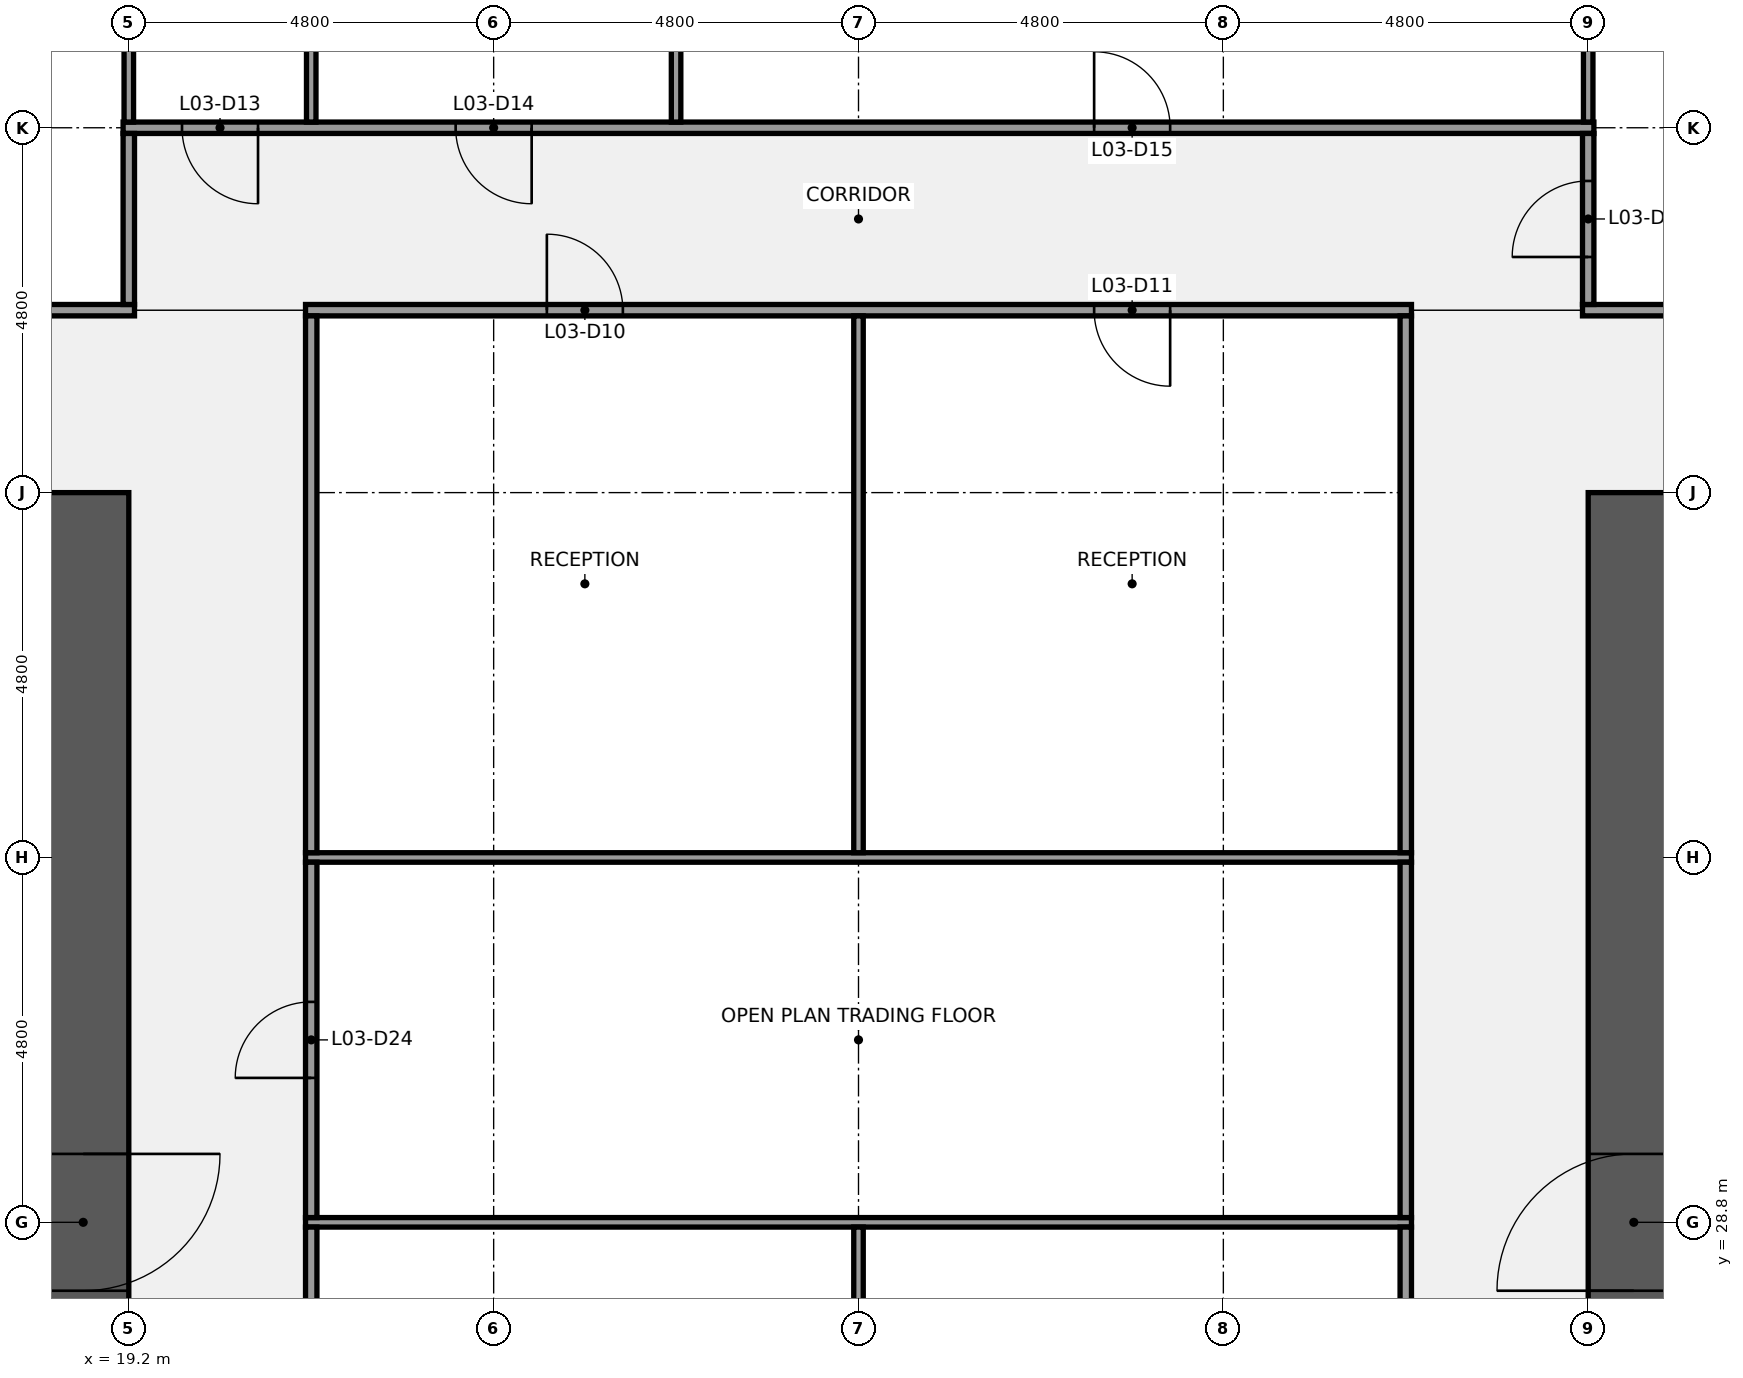
"""IFC4 building model, lengths in metres.
Left out: names, types, materials, properties, quantities, classifications, styles, units other than length and angle.
Written with IfcOpenShell. Run it as: python <this file> out.ifc"""

import sys

from ifc_helpers import new_model, si_unit, direction, frame, frame_2d, origin, place, context, subcontext, project, spatial, rectangle, extrude, element, fill, save


model = new_model("IFC4")
c1 = context("Model", 3, precision=1e-05, world=origin(), true_north=direction((0.0, 1.0)))
c2 = subcontext(c1, "Body", "Model", "MODEL_VIEW")
j1 = project(units=[si_unit("LENGTHUNIT", "METRE"), si_unit("PLANEANGLEUNIT", "RADIAN")], contexts=[c1])
p1 = place(None, origin())
s1 = spatial("IfcSite", under=j1, at=p1, CompositionType="ELEMENT")
p2 = place(p1, origin())
s2 = spatial("IfcBuilding", under=s1, at=p2, CompositionType="ELEMENT")
p3 = place(p2, frame((0.0, 0.0, 21.4)))
s3 = spatial("IfcBuildingStorey", under=s2, at=p3, CompositionType="ELEMENT", Elevation=21.4)
p4 = place(p3, frame((18.6, 38.4, 0.0), z_axis=(0.0, 0.0, 1.0), x_axis=(0.0, -1.0, 0.0)))
e1 = element("IfcWall", 1, at=p4, inside=s3, PredefinedType="SHEAR", context=c2, shape_type="SweptSolid", body=[
    extrude(rectangle(XDim=28.8, YDim=1.2, at=frame_2d((14.4, 0.0))), origin(), (0.0, 0.0, 1.0), 4.24),
])
p5 = place(p4, frame((18.3, 0.0, 0.0)))
e2 = element("IfcOpeningElement", 2, at=p5, cuts=e1, PredefinedType="OPENING", context=c2, shape_type="SweptSolid", body=[
    extrude(rectangle(XDim=1.8, YDim=2.1, at=frame_2d((0.9, 1.05))), frame((0.0, 0.61, 0.0), z_axis=(0.0, -1.0, 0.0), x_axis=(1.0, 0.0, 0.0)), (0.0, 0.0, 1.0), 1.22),
])
p6 = place(p4, frame((8.7, 0.0, 0.0)))
e3 = element("IfcOpeningElement", 3, at=p6, cuts=e1, PredefinedType="OPENING", context=c2, shape_type="SweptSolid", body=[
    extrude(rectangle(XDim=1.8, YDim=2.1, at=frame_2d((0.9, 1.05))), frame((0.0, 0.61, 0.0), z_axis=(0.0, -1.0, 0.0), x_axis=(1.0, 0.0, 0.0)), (0.0, 0.0, 1.0), 1.22),
])
p7 = place(p3, frame((39.0, 9.6, 0.0), z_axis=(0.0, 0.0, 1.0), x_axis=(0.0, 1.0, 0.0)))
e4 = element("IfcWall", 4, at=p7, inside=s3, PredefinedType="SHEAR", context=c2, shape_type="SweptSolid", body=[
    extrude(rectangle(XDim=28.8, YDim=1.2, at=frame_2d((14.4, 0.0))), origin(), (0.0, 0.0, 1.0), 4.24),
])
p8 = place(p7, frame((8.7, 0.0, 0.0)))
e5 = element("IfcOpeningElement", 5, at=p8, cuts=e4, PredefinedType="OPENING", context=c2, shape_type="SweptSolid", body=[
    extrude(rectangle(XDim=1.8, YDim=2.1, at=frame_2d((0.9, 1.05))), frame((0.0, 0.61, 0.0), z_axis=(0.0, -1.0, 0.0), x_axis=(1.0, 0.0, 0.0)), (0.0, 0.0, 1.0), 1.22),
])
p9 = place(p7, frame((18.3, 0.0, 0.0)))
e6 = element("IfcOpeningElement", 6, at=p9, cuts=e4, PredefinedType="OPENING", context=c2, shape_type="SweptSolid", body=[
    extrude(rectangle(XDim=1.8, YDim=2.1, at=frame_2d((0.9, 1.05))), frame((0.0, 0.61, 0.0), z_axis=(0.0, -1.0, 0.0), x_axis=(1.0, 0.0, 0.0)), (0.0, 0.0, 1.0), 1.22),
])
for number, where, z_axis, x_axis in (
    (7, (21.525, 28.8, 0.0), (0.0, 0.0, 1.0), (1.0, 0.0, 0.0)),
    (8, (21.525, 33.6, 0.0), (0.0, 0.0, 1.0), (1.0, 0.0, 0.0)),
):
    element("IfcWall", number, at=place(p3, frame(where, z_axis=z_axis, x_axis=x_axis)), inside=s3, PredefinedType="PARTITIONING", context=c2, shape_type="SweptSolid", body=[
        extrude(rectangle(XDim=14.55, YDim=0.125, at=frame_2d((7.275, 0.0))), origin(), (0.0, 0.0, 1.0), 3.27),
    ])
p10 = place(p3, frame((14.325, 40.8, 0.0), z_axis=(0.0, 0.0, 1.0), x_axis=(1.0, 0.0, 0.0)))
e9 = element("IfcWall", 9, at=p10, inside=s3, PredefinedType="PARTITIONING", context=c2, shape_type="SweptSolid", body=[
    extrude(rectangle(XDim=4.95, YDim=0.15, at=frame_2d((2.475, 0.0))), origin(), (0.0, 0.0, 1.0), 3.27),
])
p11 = place(p10, frame((1.975, 0.0, 0.0)))
e10 = element("IfcOpeningElement", 10, at=p11, cuts=e9, PredefinedType="OPENING", context=c2, shape_type="SweptSolid", body=[
    extrude(rectangle(XDim=1.0, YDim=2.1, at=frame_2d((0.5, 1.05))), frame((0.0, 0.085, 0.0), z_axis=(0.0, -1.0, 0.0), x_axis=(1.0, 0.0, 0.0)), (0.0, 0.0, 1.0), 0.17),
])
p12 = place(p3, frame((21.525, 40.8, 0.0), z_axis=(0.0, 0.0, 1.0), x_axis=(1.0, 0.0, 0.0)))
e11 = element("IfcWall", 11, at=p12, inside=s3, PredefinedType="PARTITIONING", context=c2, shape_type="SweptSolid", body=[
    extrude(rectangle(XDim=14.55, YDim=0.15, at=frame_2d((7.275, 0.0))), origin(), (0.0, 0.0, 1.0), 3.27),
])
p13 = place(p12, frame((3.175, 0.0, 0.0)))
e12 = element("IfcOpeningElement", 12, at=p13, cuts=e11, PredefinedType="OPENING", context=c2, shape_type="SweptSolid", body=[
    extrude(rectangle(XDim=1.0, YDim=2.1, at=frame_2d((0.5, 1.05))), frame((0.0, 0.085, 0.0), z_axis=(0.0, -1.0, 0.0), x_axis=(1.0, 0.0, 0.0)), (0.0, 0.0, 1.0), 0.17),
])
p14 = place(p12, frame((10.375, 0.0, 0.0)))
e13 = element("IfcOpeningElement", 13, at=p14, cuts=e11, PredefinedType="OPENING", context=c2, shape_type="SweptSolid", body=[
    extrude(rectangle(XDim=1.0, YDim=2.1, at=frame_2d((0.5, 1.05))), frame((0.0, 0.085, 0.0), z_axis=(0.0, -1.0, 0.0), x_axis=(1.0, 0.0, 0.0)), (0.0, 0.0, 1.0), 0.17),
])
p15 = place(p3, frame((38.325, 40.8, 0.0), z_axis=(0.0, 0.0, 1.0), x_axis=(1.0, 0.0, 0.0)))
e14 = element("IfcWall", 14, at=p15, inside=s3, PredefinedType="PARTITIONING", context=c2, shape_type="SweptSolid", body=[
    extrude(rectangle(XDim=9.75, YDim=0.15, at=frame_2d((4.875, 0.0))), origin(), (0.0, 0.0, 1.0), 3.27),
])
p16 = place(p15, frame((3.175, 0.0, 0.0)))
e15 = element("IfcOpeningElement", 15, at=p16, cuts=e14, PredefinedType="OPENING", context=c2, shape_type="SweptSolid", body=[
    extrude(rectangle(XDim=1.0, YDim=2.1, at=frame_2d((0.5, 1.05))), frame((0.0, 0.085, 0.0), z_axis=(0.0, -1.0, 0.0), x_axis=(1.0, 0.0, 0.0)), (0.0, 0.0, 1.0), 0.17),
])
p17 = place(p3, frame((19.125, 43.2, 0.0), z_axis=(0.0, 0.0, 1.0), x_axis=(1.0, 0.0, 0.0)))
e16 = element("IfcWall", 16, at=p17, inside=s3, PredefinedType="PARTITIONING", context=c2, shape_type="SweptSolid", body=[
    extrude(rectangle(XDim=19.35, YDim=0.15, at=frame_2d((9.675, 0.0))), origin(), (0.0, 0.0, 1.0), 3.27),
])
p18 = place(p17, frame((0.775, 0.0, 0.0)))
e17 = element("IfcOpeningElement", 17, at=p18, cuts=e16, PredefinedType="OPENING", context=c2, shape_type="SweptSolid", body=[
    extrude(rectangle(XDim=1.0, YDim=2.1, at=frame_2d((0.5, 1.05))), frame((0.0, 0.085, 0.0), z_axis=(0.0, -1.0, 0.0), x_axis=(1.0, 0.0, 0.0)), (0.0, 0.0, 1.0), 0.17),
])
p19 = place(p17, frame((4.375, 0.0, 0.0)))
e18 = element("IfcOpeningElement", 18, at=p19, cuts=e16, PredefinedType="OPENING", context=c2, shape_type="SweptSolid", body=[
    extrude(rectangle(XDim=1.0, YDim=2.1, at=frame_2d((0.5, 1.05))), frame((0.0, 0.085, 0.0), z_axis=(0.0, -1.0, 0.0), x_axis=(1.0, 0.0, 0.0)), (0.0, 0.0, 1.0), 0.17),
])
p20 = place(p17, frame((12.775, 0.0, 0.0)))
e19 = element("IfcOpeningElement", 19, at=p20, cuts=e16, PredefinedType="OPENING", context=c2, shape_type="SweptSolid", body=[
    extrude(rectangle(XDim=1.0, YDim=2.1, at=frame_2d((0.5, 1.05))), frame((0.0, 0.085, 0.0), z_axis=(0.0, -1.0, 0.0), x_axis=(1.0, 0.0, 0.0)), (0.0, 0.0, 1.0), 0.17),
])
p21 = place(p3, frame((19.2, 43.275, 0.0), z_axis=(0.0, 0.0, 1.0), x_axis=(0.0, 1.0, 0.0)))
e20 = element("IfcWall", 20, at=p21, inside=s3, PredefinedType="PARTITIONING", context=c2, shape_type="SweptSolid", body=[
    extrude(rectangle(XDim=4.075, YDim=0.125, at=frame_2d((2.038, 0.0))), origin(), (0.0, 0.0, 1.0), 3.27),
])
p22 = place(p3, frame((19.2, 40.875, 0.0), z_axis=(0.0, 0.0, 1.0), x_axis=(0.0, 1.0, 0.0)))
e21 = element("IfcWall", 21, at=p22, inside=s3, PredefinedType="PARTITIONING", context=c2, shape_type="SweptSolid", body=[
    extrude(rectangle(XDim=2.25, YDim=0.15, at=frame_2d((1.125, 0.0))), origin(), (0.0, 0.0, 1.0), 3.27),
])
p23 = place(p3, frame((21.6, 43.275, 0.0), z_axis=(0.0, 0.0, 1.0), x_axis=(0.0, 1.0, 0.0)))
e22 = element("IfcWall", 22, at=p23, inside=s3, PredefinedType="PARTITIONING", context=c2, shape_type="SweptSolid", body=[
    extrude(rectangle(XDim=4.625, YDim=0.125, at=frame_2d((2.312, 0.0))), origin(), (0.0, 0.0, 1.0), 3.27),
])
p24 = place(p3, frame((21.6, 21.663, 0.0), z_axis=(0.0, 0.0, 1.0), x_axis=(0.0, 1.0, 0.0)))
e23 = element("IfcWall", 23, at=p24, inside=s3, PredefinedType="PARTITIONING", context=c2, shape_type="SweptSolid", body=[
    extrude(rectangle(XDim=7.075, YDim=0.15, at=frame_2d((3.538, 0.0))), origin(), (0.0, 0.0, 1.0), 3.27),
])
p25 = place(p24, frame((3.038, 0.0, 0.0)))
e24 = element("IfcOpeningElement", 24, at=p25, cuts=e23, PredefinedType="OPENING", context=c2, shape_type="SweptSolid", body=[
    extrude(rectangle(XDim=1.0, YDim=2.1, at=frame_2d((0.5, 1.05))), frame((0.0, 0.085, 0.0), z_axis=(0.0, -1.0, 0.0), x_axis=(1.0, 0.0, 0.0)), (0.0, 0.0, 1.0), 0.17),
])
p26 = place(p3, frame((21.6, 28.863, 0.0), z_axis=(0.0, 0.0, 1.0), x_axis=(0.0, 1.0, 0.0)))
e25 = element("IfcWall", 25, at=p26, inside=s3, PredefinedType="PARTITIONING", context=c2, shape_type="SweptSolid", body=[
    extrude(rectangle(XDim=4.675, YDim=0.15, at=frame_2d((2.337, 0.0))), origin(), (0.0, 0.0, 1.0), 3.27),
])
p27 = place(p26, frame((1.837, 0.0, 0.0)))
e26 = element("IfcOpeningElement", 26, at=p27, cuts=e25, PredefinedType="OPENING", context=c2, shape_type="SweptSolid", body=[
    extrude(rectangle(XDim=1.0, YDim=2.1, at=frame_2d((0.5, 1.05))), frame((0.0, 0.085, 0.0), z_axis=(0.0, -1.0, 0.0), x_axis=(1.0, 0.0, 0.0)), (0.0, 0.0, 1.0), 0.17),
])
p28 = place(p3, frame((21.6, 33.663, 0.0), z_axis=(0.0, 0.0, 1.0), x_axis=(0.0, 1.0, 0.0)))
e27 = element("IfcWall", 27, at=p28, inside=s3, PredefinedType="PARTITIONING", context=c2, shape_type="SweptSolid", body=[
    extrude(rectangle(XDim=7.062, YDim=0.15, at=frame_2d((3.531, 0.0))), origin(), (0.0, 0.0, 1.0), 3.27),
])
p29 = place(p3, frame((26.4, 43.275, 0.0), z_axis=(0.0, 0.0, 1.0), x_axis=(0.0, 1.0, 0.0)))
e28 = element("IfcWall", 28, at=p29, inside=s3, PredefinedType="PARTITIONING", context=c2, shape_type="SweptSolid", body=[
    extrude(rectangle(XDim=4.625, YDim=0.125, at=frame_2d((2.312, 0.0))), origin(), (0.0, 0.0, 1.0), 3.27),
])
p30 = place(p3, frame((28.8, 21.663, 0.0), z_axis=(0.0, 0.0, 1.0), x_axis=(0.0, 1.0, 0.0)))
e29 = element("IfcWall", 29, at=p30, inside=s3, PredefinedType="PARTITIONING", context=c2, shape_type="SweptSolid", body=[
    extrude(rectangle(XDim=7.075, YDim=0.125, at=frame_2d((3.538, 0.0))), origin(), (0.0, 0.0, 1.0), 3.27),
])
p31 = place(p3, frame((28.8, 33.663, 0.0), z_axis=(0.0, 0.0, 1.0), x_axis=(0.0, 1.0, 0.0)))
e30 = element("IfcWall", 30, at=p31, inside=s3, PredefinedType="PARTITIONING", context=c2, shape_type="SweptSolid", body=[
    extrude(rectangle(XDim=7.062, YDim=0.125, at=frame_2d((3.531, 0.0))), origin(), (0.0, 0.0, 1.0), 3.27),
])
p32 = place(p3, frame((36.0, 21.663, 0.0), z_axis=(0.0, 0.0, 1.0), x_axis=(0.0, 1.0, 0.0)))
e31 = element("IfcWall", 31, at=p32, inside=s3, PredefinedType="PARTITIONING", context=c2, shape_type="SweptSolid", body=[
    extrude(rectangle(XDim=7.075, YDim=0.15, at=frame_2d((3.538, 0.0))), origin(), (0.0, 0.0, 1.0), 3.27),
])
p33 = place(p32, frame((3.038, 0.0, 0.0)))
e32 = element("IfcOpeningElement", 32, at=p33, cuts=e31, PredefinedType="OPENING", context=c2, shape_type="SweptSolid", body=[
    extrude(rectangle(XDim=1.0, YDim=2.1, at=frame_2d((0.5, 1.05))), frame((0.0, 0.085, 0.0), z_axis=(0.0, -1.0, 0.0), x_axis=(1.0, 0.0, 0.0)), (0.0, 0.0, 1.0), 0.17),
])
p34 = place(p3, frame((36.0, 28.863, 0.0), z_axis=(0.0, 0.0, 1.0), x_axis=(0.0, 1.0, 0.0)))
e33 = element("IfcWall", 33, at=p34, inside=s3, PredefinedType="PARTITIONING", context=c2, shape_type="SweptSolid", body=[
    extrude(rectangle(XDim=4.675, YDim=0.15, at=frame_2d((2.337, 0.0))), origin(), (0.0, 0.0, 1.0), 3.27),
])
p35 = place(p3, frame((36.0, 33.663, 0.0), z_axis=(0.0, 0.0, 1.0), x_axis=(0.0, 1.0, 0.0)))
e34 = element("IfcWall", 34, at=p35, inside=s3, PredefinedType="PARTITIONING", context=c2, shape_type="SweptSolid", body=[
    extrude(rectangle(XDim=7.062, YDim=0.15, at=frame_2d((3.531, 0.0))), origin(), (0.0, 0.0, 1.0), 3.27),
])
p36 = place(p3, frame((38.4, 43.275, 0.0), z_axis=(0.0, 0.0, 1.0), x_axis=(0.0, 1.0, 0.0)))
e35 = element("IfcWall", 35, at=p36, inside=s3, PredefinedType="PARTITIONING", context=c2, shape_type="SweptSolid", body=[
    extrude(rectangle(XDim=4.075, YDim=0.125, at=frame_2d((2.038, 0.0))), origin(), (0.0, 0.0, 1.0), 3.27),
])
p37 = place(p3, frame((38.4, 40.875, 0.0), z_axis=(0.0, 0.0, 1.0), x_axis=(0.0, 1.0, 0.0)))
e36 = element("IfcWall", 36, at=p37, inside=s3, PredefinedType="PARTITIONING", context=c2, shape_type="SweptSolid", body=[
    extrude(rectangle(XDim=2.25, YDim=0.15, at=frame_2d((1.125, 0.0))), origin(), (0.0, 0.0, 1.0), 3.27),
])
p38 = place(p37, frame((0.625, 0.0, 0.0)))
e37 = element("IfcOpeningElement", 37, at=p38, cuts=e36, PredefinedType="OPENING", context=c2, shape_type="SweptSolid", body=[
    extrude(rectangle(XDim=1.0, YDim=2.1, at=frame_2d((0.5, 1.05))), frame((0.0, 0.085, 0.0), z_axis=(0.0, -1.0, 0.0), x_axis=(1.0, 0.0, 0.0)), (0.0, 0.0, 1.0), 0.17),
])
p39 = place(p6, origin())
e38 = element("IfcDoor", 38, at=p39, inside=s3, OperationType="DOUBLE_DOOR_SINGLE_SWING", PredefinedType="DOOR", context=c2, shape_type="SweptSolid", body=[
    extrude(rectangle(XDim=1.8, YDim=2.1, at=frame_2d((0.9, 1.05))), frame((0.0, 0.025, 0.0), z_axis=(0.0, -1.0, 0.0), x_axis=(1.0, 0.0, 0.0)), (0.0, 0.0, 1.0), 0.05),
])
fill(e3, e38)
p40 = place(p9, origin())
e39 = element("IfcDoor", 39, at=p40, inside=s3, OperationType="DOUBLE_DOOR_SINGLE_SWING", PredefinedType="DOOR", context=c2, shape_type="SweptSolid", body=[
    extrude(rectangle(XDim=1.8, YDim=2.1, at=frame_2d((0.9, 1.05))), frame((0.0, 0.025, 0.0), z_axis=(0.0, -1.0, 0.0), x_axis=(1.0, 0.0, 0.0)), (0.0, 0.0, 1.0), 0.05),
])
fill(e6, e39)
p41 = place(p13, origin())
e40 = element("IfcDoor", 40, at=p41, inside=s3, OperationType="SINGLE_SWING_LEFT", PredefinedType="DOOR", context=c2, shape_type="SweptSolid", body=[
    extrude(rectangle(XDim=1.0, YDim=2.1, at=frame_2d((0.5, 1.05))), frame((0.0, 0.025, 0.0), z_axis=(0.0, -1.0, 0.0), x_axis=(1.0, 0.0, 0.0)), (0.0, 0.0, 1.0), 0.05),
])
fill(e12, e40)
p42 = place(p14, origin())
e41 = element("IfcDoor", 41, at=p42, inside=s3, OperationType="SINGLE_SWING_RIGHT", PredefinedType="DOOR", context=c2, shape_type="SweptSolid", body=[
    extrude(rectangle(XDim=1.0, YDim=2.1, at=frame_2d((0.5, 1.05))), frame((0.0, 0.025, 0.0), z_axis=(0.0, -1.0, 0.0), x_axis=(1.0, 0.0, 0.0)), (0.0, 0.0, 1.0), 0.05),
])
fill(e13, e41)
p43 = place(p18, origin())
e42 = element("IfcDoor", 42, at=p43, inside=s3, OperationType="SINGLE_SWING_RIGHT", PredefinedType="DOOR", context=c2, shape_type="SweptSolid", body=[
    extrude(rectangle(XDim=1.0, YDim=2.1, at=frame_2d((0.5, 1.05))), frame((0.0, 0.025, 0.0), z_axis=(0.0, -1.0, 0.0), x_axis=(1.0, 0.0, 0.0)), (0.0, 0.0, 1.0), 0.05),
])
fill(e17, e42)
p44 = place(p19, origin())
e43 = element("IfcDoor", 43, at=p44, inside=s3, OperationType="SINGLE_SWING_RIGHT", PredefinedType="DOOR", context=c2, shape_type="SweptSolid", body=[
    extrude(rectangle(XDim=1.0, YDim=2.1, at=frame_2d((0.5, 1.05))), frame((0.0, 0.025, 0.0), z_axis=(0.0, -1.0, 0.0), x_axis=(1.0, 0.0, 0.0)), (0.0, 0.0, 1.0), 0.05),
])
fill(e18, e43)
p45 = place(p20, origin())
e44 = element("IfcDoor", 44, at=p45, inside=s3, OperationType="SINGLE_SWING_LEFT", PredefinedType="DOOR", context=c2, shape_type="SweptSolid", body=[
    extrude(rectangle(XDim=1.0, YDim=2.1, at=frame_2d((0.5, 1.05))), frame((0.0, 0.025, 0.0), z_axis=(0.0, -1.0, 0.0), x_axis=(1.0, 0.0, 0.0)), (0.0, 0.0, 1.0), 0.05),
])
fill(e19, e44)
p46 = place(p27, origin())
e45 = element("IfcDoor", 45, at=p46, inside=s3, OperationType="SINGLE_SWING_LEFT", PredefinedType="DOOR", context=c2, shape_type="SweptSolid", body=[
    extrude(rectangle(XDim=1.0, YDim=2.1, at=frame_2d((0.5, 1.05))), frame((0.0, 0.025, 0.0), z_axis=(0.0, -1.0, 0.0), x_axis=(1.0, 0.0, 0.0)), (0.0, 0.0, 1.0), 0.05),
])
fill(e26, e45)
p47 = place(p38, origin())
e46 = element("IfcDoor", 46, at=p47, inside=s3, OperationType="SINGLE_SWING_LEFT", PredefinedType="DOOR", context=c2, shape_type="SweptSolid", body=[
    extrude(rectangle(XDim=1.0, YDim=2.1, at=frame_2d((0.5, 1.05))), frame((0.0, 0.025, 0.0), z_axis=(0.0, -1.0, 0.0), x_axis=(1.0, 0.0, 0.0)), (0.0, 0.0, 1.0), 0.05),
])
fill(e37, e46)
save(model, sys.argv[1])
